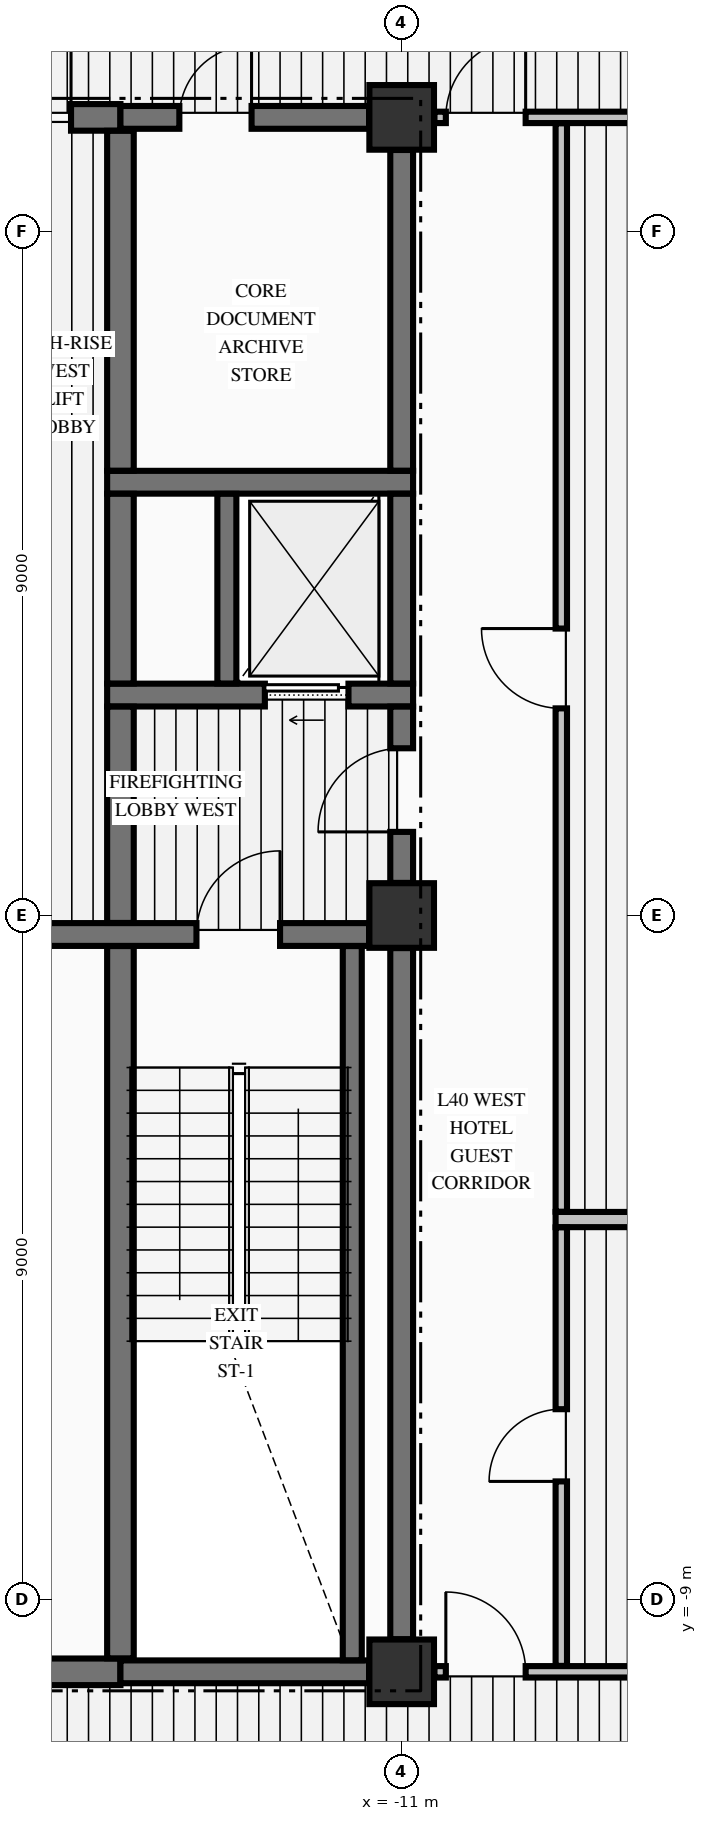
"""IFC4 building model, lengths in metres.
Left out: names, types, materials, properties, quantities, classifications, styles, units other than length and angle.
Written with IfcOpenShell. Run it as: python <this file> out.ifc"""

import sys

from ifc_helpers import new_model, si_unit, direction, frame, frame_2d, origin, origin_2d, place, context, subcontext, project, spatial, rectangle, extrude, element, fill, save


model = new_model("IFC4")
c1 = context("Model", 3, precision=1e-05, world=origin(), true_north=direction((0.0, 1.0)))
c2 = subcontext(c1, "Body", "Model", "MODEL_VIEW")
j1 = project(units=[si_unit("LENGTHUNIT", "METRE"), si_unit("PLANEANGLEUNIT", "RADIAN")], contexts=[c1])
p1 = place(None, origin())
s1 = spatial("IfcSite", under=j1, at=p1, CompositionType="ELEMENT")
p2 = place(p1, origin())
s2 = spatial("IfcBuilding", under=s1, at=p2, CompositionType="ELEMENT")
p3 = place(p2, frame((0.0, 0.0, 158.24)))
s3 = spatial("IfcBuildingStorey", under=s2, at=p3, CompositionType="ELEMENT", Elevation=158.24)
for number, where, z_axis, x_axis in (
    (1, (-11.0, -9.95, -0.425), (0.0, 0.0, 1.0), (1.0, 0.0, 0.0)),
    (2, (-11.0, 0.0, -0.425), (0.0, 0.0, 1.0), (1.0, 0.0, 0.0)),
    (3, (-11.0, 10.5, -0.425), (0.0, 0.0, 1.0), (1.0, 0.0, 0.0)),
):
    element("IfcColumn", number, at=place(p3, frame(where, z_axis=z_axis, x_axis=x_axis)), inside=s3, PredefinedType="COLUMN", context=c2, shape_type="SweptSolid", body=[
        extrude(rectangle(XDim=0.85, YDim=0.85, at=origin_2d()), origin(), (0.0, 0.0, 1.0), 4.595),
    ])
p4 = place(p3, frame((-19.571, -9.95, 0.0), z_axis=(0.0, 0.0, 1.0), x_axis=(1.0, 0.0, 0.0)))
e4 = element("IfcWall", 4, at=p4, inside=s3, PredefinedType="SHEAR", context=c2, shape_type="SweptSolid", body=[
    extrude(rectangle(XDim=4.871, YDim=0.35, at=frame_2d((2.436, 0.0))), origin(), (0.0, 0.0, 1.0), 4.17),
])
p5 = place(p4, frame((0.746, 0.0, 0.0)))
e5 = element("IfcOpeningElement", 5, at=p5, cuts=e4, PredefinedType="OPENING", context=c2, shape_type="SweptSolid", body=[
    extrude(rectangle(XDim=1.05, YDim=2.15, at=frame_2d((0.525, 1.075))), frame((0.0, 0.185, 0.0), z_axis=(0.0, -1.0, 0.0), x_axis=(1.0, 0.0, 0.0)), (0.0, 0.0, 1.0), 0.37),
])
p6 = place(p3, frame((-14.7, -9.95, 0.0), z_axis=(0.0, 0.0, 1.0), x_axis=(1.0, 0.0, 0.0)))
e6 = element("IfcWall", 6, at=p6, inside=s3, PredefinedType="SHEAR", context=c2, shape_type="SweptSolid", body=[
    extrude(rectangle(XDim=3.271, YDim=0.3, at=frame_2d((1.635, 0.0))), origin(), (0.0, 0.0, 1.0), 4.17),
])
p7 = place(p3, frame((-19.571, -0.25, 0.0), z_axis=(0.0, 0.0, 1.0), x_axis=(1.0, 0.0, 0.0)))
e7 = element("IfcWall", 7, at=p7, inside=s3, PredefinedType="SHEAR", context=c2, shape_type="SweptSolid", body=[
    extrude(rectangle(XDim=8.142, YDim=0.3, at=frame_2d((4.071, 0.0))), origin(), (0.0, 0.0, 1.0), 4.17),
])
p8 = place(p7, frame((5.871, 0.0, 0.0)))
e8 = element("IfcOpeningElement", 8, at=p8, cuts=e7, PredefinedType="OPENING", context=c2, shape_type="SweptSolid", body=[
    extrude(rectangle(XDim=1.1, YDim=2.15, at=frame_2d((0.55, 1.075))), frame((0.0, 0.16, 0.0), z_axis=(0.0, -1.0, 0.0), x_axis=(1.0, 0.0, 0.0)), (0.0, 0.0, 1.0), 0.32),
])
p9 = place(p3, frame((-14.875, 2.9, 0.0), z_axis=(0.0, 0.0, 1.0), x_axis=(1.0, 0.0, 0.0)))
e9 = element("IfcWall", 9, at=p9, inside=s3, PredefinedType="SHEAR", context=c2, shape_type="SweptSolid", body=[
    extrude(rectangle(XDim=4.025, YDim=0.3, at=frame_2d((2.012, 0.0))), origin(), (0.0, 0.0, 1.0), 4.17),
])
p10 = place(p9, frame((2.075, 0.0, 0.0)))
e10 = element("IfcOpeningElement", 10, at=p10, cuts=e9, PredefinedType="OPENING", context=c2, shape_type="SweptSolid", body=[
    extrude(rectangle(XDim=1.1, YDim=2.2, at=frame_2d((0.55, 1.1))), frame((0.0, 0.16, 0.0), z_axis=(0.0, -1.0, 0.0), x_axis=(1.0, 0.0, 0.0)), (0.0, 0.0, 1.0), 0.32),
])
p11 = place(p3, frame((-14.875, 5.7, 0.0), z_axis=(0.0, 0.0, 1.0), x_axis=(1.0, 0.0, 0.0)))
e11 = element("IfcWall", 11, at=p11, inside=s3, PredefinedType="SHEAR", context=c2, shape_type="SweptSolid", body=[
    extrude(rectangle(XDim=4.025, YDim=0.3, at=frame_2d((2.012, 0.0))), origin(), (0.0, 0.0, 1.0), 4.17),
])
p12 = place(p3, frame((-19.571, 10.5, 0.0), z_axis=(0.0, 0.0, 1.0), x_axis=(1.0, 0.0, 0.0)))
e12 = element("IfcWall", 12, at=p12, inside=s3, PredefinedType="SHEAR", context=c2, shape_type="SweptSolid", body=[
    extrude(rectangle(XDim=4.871, YDim=0.35, at=frame_2d((2.436, 0.0))), origin(), (0.0, 0.0, 1.0), 4.17),
])
p13 = place(p12, frame((3.121, 0.0, 0.0)))
e13 = element("IfcOpeningElement", 13, at=p13, cuts=e12, PredefinedType="OPENING", context=c2, shape_type="SweptSolid", body=[
    extrude(rectangle(XDim=1.1, YDim=2.15, at=frame_2d((0.55, 1.075))), frame((0.0, 0.185, 0.0), z_axis=(0.0, -1.0, 0.0), x_axis=(1.0, 0.0, 0.0)), (0.0, 0.0, 1.0), 0.37),
])
p14 = place(p3, frame((-14.7, 10.5, 0.0), z_axis=(0.0, 0.0, 1.0), x_axis=(1.0, 0.0, 0.0)))
e14 = element("IfcWall", 14, at=p14, inside=s3, PredefinedType="SHEAR", context=c2, shape_type="SweptSolid", body=[
    extrude(rectangle(XDim=3.271, YDim=0.3, at=frame_2d((1.635, 0.0))), origin(), (0.0, 0.0, 1.0), 4.17),
])
p15 = place(p14, frame((0.775, 0.0, 0.0)))
e15 = element("IfcOpeningElement", 15, at=p15, cuts=e14, PredefinedType="OPENING", context=c2, shape_type="SweptSolid", body=[
    extrude(rectangle(XDim=0.95, YDim=2.15, at=frame_2d((0.475, 1.075))), frame((0.0, 0.16, 0.0), z_axis=(0.0, -1.0, 0.0), x_axis=(1.0, 0.0, 0.0)), (0.0, 0.0, 1.0), 0.32),
])
p16 = place(p3, frame((-10.569, -9.95, 0.0), z_axis=(0.0, 0.0, 1.0), x_axis=(1.0, 0.0, 0.0)))
e16 = element("IfcWall", 16, at=p16, inside=s3, PredefinedType="PARTITIONING", context=c2, shape_type="SweptSolid", body=[
    extrude(rectangle(XDim=21.138, YDim=0.15, at=frame_2d((10.569, 0.0))), origin(), (0.0, 0.0, 1.0), 4.17),
])
p17 = place(p16, frame((0.15, 0.0, 0.0)))
e17 = element("IfcOpeningElement", 17, at=p17, cuts=e16, PredefinedType="OPENING", context=c2, shape_type="SweptSolid", body=[
    extrude(rectangle(XDim=1.05, YDim=2.15, at=frame_2d((0.525, 1.075))), frame((0.0, 0.085, 0.0), z_axis=(0.0, -1.0, 0.0), x_axis=(1.0, 0.0, 0.0)), (0.0, 0.0, 1.0), 0.17),
])
p18 = place(p16, frame((19.938, 0.0, 0.0)))
e18 = element("IfcOpeningElement", 18, at=p18, cuts=e16, PredefinedType="OPENING", context=c2, shape_type="SweptSolid", body=[
    extrude(rectangle(XDim=1.05, YDim=2.15, at=frame_2d((0.525, 1.075))), frame((0.0, 0.085, 0.0), z_axis=(0.0, -1.0, 0.0), x_axis=(1.0, 0.0, 0.0)), (0.0, 0.0, 1.0), 0.17),
])
p19 = place(p16, frame((13.944, 0.0, 0.0)))
e19 = element("IfcOpeningElement", 19, at=p19, cuts=e16, PredefinedType="OPENING", context=c2, shape_type="SweptSolid", body=[
    extrude(rectangle(XDim=0.95, YDim=2.15, at=frame_2d((0.475, 1.075))), frame((0.0, 0.085, 0.0), z_axis=(0.0, -1.0, 0.0), x_axis=(1.0, 0.0, 0.0)), (0.0, 0.0, 1.0), 0.17),
])
p20 = place(p3, frame((-8.975, -4.0, 0.0), z_axis=(0.0, 0.0, 1.0), x_axis=(1.0, 0.0, 0.0)))
e20 = element("IfcWall", 20, at=p20, inside=s3, PredefinedType="PARTITIONING", context=c2, shape_type="SweptSolid", body=[
    extrude(rectangle(XDim=10.875, YDim=0.2, at=frame_2d((5.438, 0.0))), origin(), (0.0, 0.0, 1.0), 4.17),
])
p21 = place(p3, frame((-10.569, 10.5, 0.0), z_axis=(0.0, 0.0, 1.0), x_axis=(1.0, 0.0, 0.0)))
e21 = element("IfcWall", 21, at=p21, inside=s3, PredefinedType="PARTITIONING", context=c2, shape_type="SweptSolid", body=[
    extrude(rectangle(XDim=21.138, YDim=0.15, at=frame_2d((10.569, 0.0))), origin(), (0.0, 0.0, 1.0), 4.17),
])
p22 = place(p21, frame((0.15, 0.0, 0.0)))
e22 = element("IfcOpeningElement", 22, at=p22, cuts=e21, PredefinedType="OPENING", context=c2, shape_type="SweptSolid", body=[
    extrude(rectangle(XDim=1.05, YDim=2.15, at=frame_2d((0.525, 1.075))), frame((0.0, 0.085, 0.0), z_axis=(0.0, -1.0, 0.0), x_axis=(1.0, 0.0, 0.0)), (0.0, 0.0, 1.0), 0.17),
])
p23 = place(p21, frame((19.938, 0.0, 0.0)))
e23 = element("IfcOpeningElement", 23, at=p23, cuts=e21, PredefinedType="OPENING", context=c2, shape_type="SweptSolid", body=[
    extrude(rectangle(XDim=1.05, YDim=2.15, at=frame_2d((0.525, 1.075))), frame((0.0, 0.085, 0.0), z_axis=(0.0, -1.0, 0.0), x_axis=(1.0, 0.0, 0.0)), (0.0, 0.0, 1.0), 0.17),
])
p24 = place(p3, frame((-14.7, -9.773, 0.0), z_axis=(0.0, 0.0, 1.0), x_axis=(0.0, 1.0, 0.0)))
e24 = element("IfcWall", 24, at=p24, inside=s3, PredefinedType="SHEAR", context=c2, shape_type="SweptSolid", body=[
    extrude(rectangle(XDim=9.371, YDim=0.35, at=frame_2d((4.686, 0.0))), origin(), (0.0, 0.0, 1.0), 4.17),
])
p25 = place(p3, frame((-14.7, -0.098, 0.0), z_axis=(0.0, 0.0, 1.0), x_axis=(0.0, 1.0, 0.0)))
e25 = element("IfcWall", 25, at=p25, inside=s3, PredefinedType="SHEAR", context=c2, shape_type="SweptSolid", body=[
    extrude(rectangle(XDim=2.846, YDim=0.35, at=frame_2d((1.423, 0.0))), origin(), (0.0, 0.0, 1.0), 4.17),
])
p26 = place(p3, frame((-14.7, 3.052, 0.0), z_axis=(0.0, 0.0, 1.0), x_axis=(0.0, 1.0, 0.0)))
e26 = element("IfcWall", 26, at=p26, inside=s3, PredefinedType="SHEAR", context=c2, shape_type="SweptSolid", body=[
    extrude(rectangle(XDim=2.496, YDim=0.35, at=frame_2d((1.248, 0.0))), origin(), (0.0, 0.0, 1.0), 4.17),
])
p27 = place(p3, frame((-14.7, 5.852, 0.0), z_axis=(0.0, 0.0, 1.0), x_axis=(0.0, 1.0, 0.0)))
e27 = element("IfcWall", 27, at=p27, inside=s3, PredefinedType="SHEAR", context=c2, shape_type="SweptSolid", body=[
    extrude(rectangle(XDim=4.471, YDim=0.35, at=frame_2d((2.235, 0.0))), origin(), (0.0, 0.0, 1.0), 4.17),
])
p28 = place(p3, frame((-13.3, 3.052, 0.0), z_axis=(0.0, 0.0, 1.0), x_axis=(0.0, 1.0, 0.0)))
e28 = element("IfcWall", 28, at=p28, inside=s3, PredefinedType="SOLIDWALL", context=c2, shape_type="SweptSolid", body=[
    extrude(rectangle(XDim=2.496, YDim=0.25, at=frame_2d((1.248, 0.0))), origin(), (0.0, 0.0, 1.0), 4.17),
])
p29 = place(p3, frame((-11.65, -9.798, 0.0), z_axis=(0.0, 0.0, 1.0), x_axis=(0.0, 1.0, 0.0)))
e29 = element("IfcWall", 29, at=p29, inside=s3, PredefinedType="SOLIDWALL", context=c2, shape_type="SweptSolid", body=[
    extrude(rectangle(XDim=9.396, YDim=0.25, at=frame_2d((4.698, 0.0))), origin(), (0.0, 0.0, 1.0), 4.17),
])
p30 = place(p3, frame((-11.0, -9.521, 0.0), z_axis=(0.0, 0.0, 1.0), x_axis=(0.0, 1.0, 0.0)))
e30 = element("IfcWall", 30, at=p30, inside=s3, PredefinedType="SHEAR", context=c2, shape_type="SweptSolid", body=[
    extrude(rectangle(XDim=9.092, YDim=0.3, at=frame_2d((4.546, 0.0))), origin(), (0.0, 0.0, 1.0), 4.17),
])
p31 = place(p3, frame((-11.0, 0.429, 0.0), z_axis=(0.0, 0.0, 1.0), x_axis=(0.0, 1.0, 0.0)))
e31 = element("IfcWall", 31, at=p31, inside=s3, PredefinedType="SHEAR", context=c2, shape_type="SweptSolid", body=[
    extrude(rectangle(XDim=2.319, YDim=0.3, at=frame_2d((1.16, 0.0))), origin(), (0.0, 0.0, 1.0), 4.17),
])
p32 = place(p31, frame((0.671, 0.0, 0.0)))
e32 = element("IfcOpeningElement", 32, at=p32, cuts=e31, PredefinedType="OPENING", context=c2, shape_type="SweptSolid", body=[
    extrude(rectangle(XDim=1.1, YDim=2.15, at=frame_2d((0.55, 1.075))), frame((0.0, 0.16, 0.0), z_axis=(0.0, -1.0, 0.0), x_axis=(1.0, 0.0, 0.0)), (0.0, 0.0, 1.0), 0.32),
])
p33 = place(p3, frame((-11.0, 3.052, 0.0), z_axis=(0.0, 0.0, 1.0), x_axis=(0.0, 1.0, 0.0)))
e33 = element("IfcWall", 33, at=p33, inside=s3, PredefinedType="SHEAR", context=c2, shape_type="SweptSolid", body=[
    extrude(rectangle(XDim=2.496, YDim=0.3, at=frame_2d((1.248, 0.0))), origin(), (0.0, 0.0, 1.0), 4.17),
])
p34 = place(p3, frame((-11.0, 5.852, 0.0), z_axis=(0.0, 0.0, 1.0), x_axis=(0.0, 1.0, 0.0)))
e34 = element("IfcWall", 34, at=p34, inside=s3, PredefinedType="SHEAR", context=c2, shape_type="SweptSolid", body=[
    extrude(rectangle(XDim=4.219, YDim=0.3, at=frame_2d((2.109, 0.0))), origin(), (0.0, 0.0, 1.0), 4.17),
])
p35 = place(p3, frame((-8.9, -9.872, 0.0), z_axis=(0.0, 0.0, 1.0), x_axis=(0.0, 1.0, 0.0)))
e35 = element("IfcWall", 35, at=p35, inside=s3, PredefinedType="PARTITIONING", context=c2, shape_type="SweptSolid", body=[
    extrude(rectangle(XDim=5.769, YDim=0.15, at=frame_2d((2.885, 0.0))), origin(), (0.0, 0.0, 1.0), 4.17),
])
p36 = place(p35, frame((2.427, 0.0, 0.0)))
e36 = element("IfcOpeningElement", 36, at=p36, cuts=e35, PredefinedType="OPENING", context=c2, shape_type="SweptSolid", body=[
    extrude(rectangle(XDim=0.95, YDim=2.15, at=frame_2d((0.475, 1.075))), frame((0.0, 0.085, 0.0), z_axis=(0.0, -1.0, 0.0), x_axis=(1.0, 0.0, 0.0)), (0.0, 0.0, 1.0), 0.17),
])
p37 = place(p3, frame((-8.9, -3.897, 0.0), z_axis=(0.0, 0.0, 1.0), x_axis=(0.0, 1.0, 0.0)))
e37 = element("IfcWall", 37, at=p37, inside=s3, PredefinedType="PARTITIONING", context=c2, shape_type="SweptSolid", body=[
    extrude(rectangle(XDim=14.319, YDim=0.15, at=frame_2d((7.16, 0.0))), origin(), (0.0, 0.0, 1.0), 4.17),
])
p38 = place(p37, frame((6.622, 0.0, 0.0)))
e38 = element("IfcOpeningElement", 38, at=p38, cuts=e37, PredefinedType="OPENING", context=c2, shape_type="SweptSolid", body=[
    extrude(rectangle(XDim=1.05, YDim=2.15, at=frame_2d((0.525, 1.075))), frame((0.0, 0.085, 0.0), z_axis=(0.0, -1.0, 0.0), x_axis=(1.0, 0.0, 0.0)), (0.0, 0.0, 1.0), 0.17),
])
p39 = place(p8, origin())
e39 = element("IfcDoor", 39, at=p39, inside=s3, OperationType="SINGLE_SWING_RIGHT", PredefinedType="DOOR", context=c2, shape_type="SweptSolid", body=[
    extrude(rectangle(XDim=1.1, YDim=2.15, at=frame_2d((0.55, 1.075))), frame((0.0, 0.025, 0.0), z_axis=(0.0, -1.0, 0.0), x_axis=(1.0, 0.0, 0.0)), (0.0, 0.0, 1.0), 0.05),
])
fill(e8, e39)
p40 = place(p32, origin())
e40 = element("IfcDoor", 40, at=p40, inside=s3, OperationType="SINGLE_SWING_LEFT", PredefinedType="DOOR", context=c2, shape_type="SweptSolid", body=[
    extrude(rectangle(XDim=1.1, YDim=2.15, at=frame_2d((0.55, 1.075))), frame((0.0, 0.025, 0.0), z_axis=(0.0, -1.0, 0.0), x_axis=(1.0, 0.0, 0.0)), (0.0, 0.0, 1.0), 0.05),
])
fill(e32, e40)
p41 = place(p10, origin())
e41 = element("IfcDoor", 41, at=p41, inside=s3, OperationType="SLIDING_TO_LEFT", PredefinedType="DOOR", context=c2, shape_type="SweptSolid", body=[
    extrude(rectangle(XDim=1.1, YDim=2.2, at=frame_2d((0.55, 1.1))), frame((0.0, 0.025, 0.0), z_axis=(0.0, -1.0, 0.0), x_axis=(1.0, 0.0, 0.0)), (0.0, 0.0, 1.0), 0.05),
])
fill(e10, e41)
p42 = place(p15, origin())
e42 = element("IfcDoor", 42, at=p42, inside=s3, OperationType="SINGLE_SWING_RIGHT", PredefinedType="DOOR", context=c2, shape_type="SweptSolid", body=[
    extrude(rectangle(XDim=0.95, YDim=2.15, at=frame_2d((0.475, 1.075))), frame((0.0, 0.025, 0.0), z_axis=(0.0, -1.0, 0.0), x_axis=(1.0, 0.0, 0.0)), (0.0, 0.0, 1.0), 0.05),
])
fill(e15, e42)
p43 = place(p13, origin())
e43 = element("IfcDoor", 43, at=p43, inside=s3, OperationType="SINGLE_SWING_RIGHT", PredefinedType="DOOR", context=c2, shape_type="SweptSolid", body=[
    extrude(rectangle(XDim=1.1, YDim=2.15, at=frame_2d((0.55, 1.075))), frame((0.0, 0.025, 0.0), z_axis=(0.0, -1.0, 0.0), x_axis=(1.0, 0.0, 0.0)), (0.0, 0.0, 1.0), 0.05),
])
fill(e13, e43)
p44 = place(p22, origin())
e44 = element("IfcDoor", 44, at=p44, inside=s3, OperationType="SINGLE_SWING_RIGHT", PredefinedType="DOOR", context=c2, shape_type="SweptSolid", body=[
    extrude(rectangle(XDim=1.05, YDim=2.15, at=frame_2d((0.525, 1.075))), frame((0.0, 0.025, 0.0), z_axis=(0.0, -1.0, 0.0), x_axis=(1.0, 0.0, 0.0)), (0.0, 0.0, 1.0), 0.05),
])
fill(e22, e44)
p45 = place(p17, origin())
e45 = element("IfcDoor", 45, at=p45, inside=s3, OperationType="SINGLE_SWING_LEFT", PredefinedType="DOOR", context=c2, shape_type="SweptSolid", body=[
    extrude(rectangle(XDim=1.05, YDim=2.15, at=frame_2d((0.525, 1.075))), frame((0.0, 0.025, 0.0), z_axis=(0.0, -1.0, 0.0), x_axis=(1.0, 0.0, 0.0)), (0.0, 0.0, 1.0), 0.05),
])
fill(e17, e45)
p46 = place(p38, origin())
e46 = element("IfcDoor", 46, at=p46, inside=s3, OperationType="SINGLE_SWING_RIGHT", PredefinedType="DOOR", context=c2, shape_type="SweptSolid", body=[
    extrude(rectangle(XDim=1.05, YDim=2.15, at=frame_2d((0.525, 1.075))), frame((0.0, 0.025, 0.0), z_axis=(0.0, -1.0, 0.0), x_axis=(1.0, 0.0, 0.0)), (0.0, 0.0, 1.0), 0.05),
])
fill(e38, e46)
p47 = place(p36, origin())
e47 = element("IfcDoor", 47, at=p47, inside=s3, OperationType="SINGLE_SWING_LEFT", PredefinedType="DOOR", context=c2, shape_type="SweptSolid", body=[
    extrude(rectangle(XDim=0.95, YDim=2.15, at=frame_2d((0.475, 1.075))), frame((0.0, 0.025, 0.0), z_axis=(0.0, -1.0, 0.0), x_axis=(1.0, 0.0, 0.0)), (0.0, 0.0, 1.0), 0.05),
])
fill(e36, e47)
save(model, sys.argv[1])
